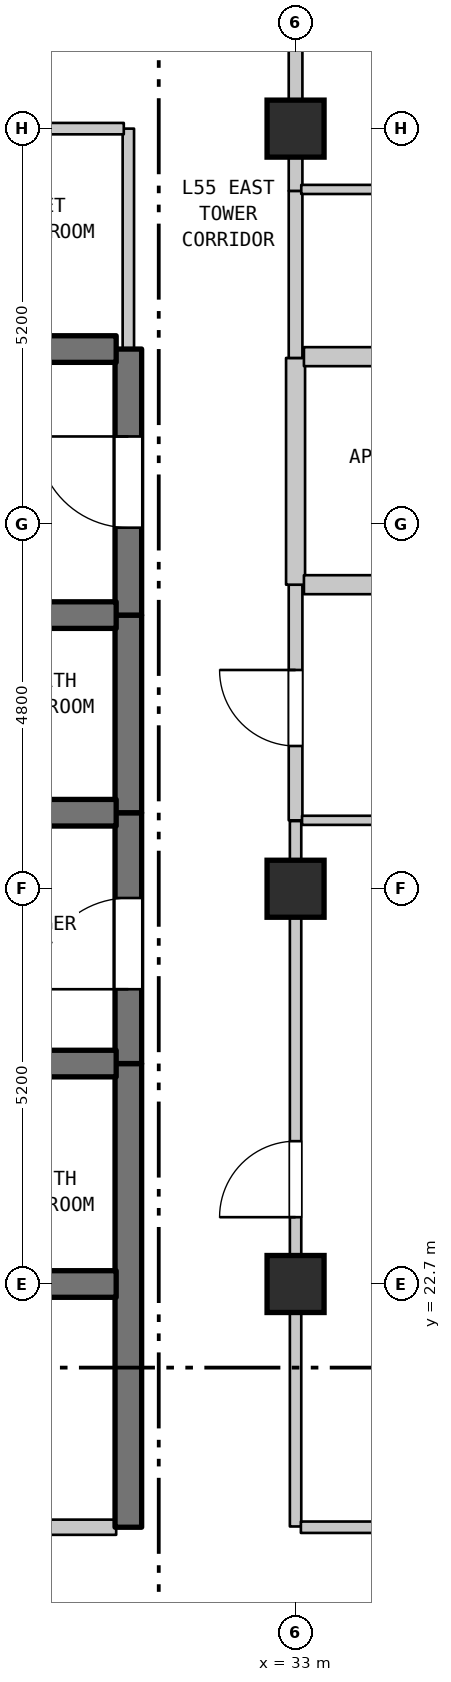
"""IFC4 building model, lengths in metres.
Left out: names, types, materials, properties, quantities, classifications, styles, units other than length and angle.
Written with IfcOpenShell. Run it as: python <this file> out.ifc"""

import sys

from ifc_helpers import new_model, si_unit, direction, frame, frame_2d, origin, origin_2d, place, context, subcontext, project, spatial, rectangle, extrude, element, fill, save


model = new_model("IFC4")
c1 = context("Model", 3, precision=1e-05, world=origin(), true_north=direction((0.0, 1.0)))
c2 = subcontext(c1, "Body", "Model", "MODEL_VIEW")
j1 = project(units=[si_unit("LENGTHUNIT", "METRE"), si_unit("PLANEANGLEUNIT", "RADIAN")], contexts=[c1])
p1 = place(None, origin())
s1 = spatial("IfcSite", under=j1, at=p1, CompositionType="ELEMENT")
p2 = place(p1, origin())
s2 = spatial("IfcBuilding", under=s1, at=p2, CompositionType="ELEMENT")
p3 = place(p2, frame((0.0, 0.0, 222.8)))
s3 = spatial("IfcBuildingStorey", under=s2, at=p3, CompositionType="ELEMENT", Elevation=222.8)
for number, where, z_axis, x_axis in (
    (1, (33.0, 22.7, 0.0), (0.0, 0.0, 1.0), (1.0, 0.0, 0.0)),
    (2, (33.0, 27.9, 0.0), (0.0, 0.0, 1.0), (1.0, 0.0, 0.0)),
    (3, (33.0, 37.9, 0.0), (0.0, 0.0, 1.0), (1.0, 0.0, 0.0)),
):
    element("IfcColumn", number, at=place(p3, frame(where, z_axis=z_axis, x_axis=x_axis)), inside=s3, PredefinedType="COLUMN", context=c2, shape_type="SweptSolid", body=[
        extrude(rectangle(XDim=0.75, YDim=0.75, at=origin_2d()), origin(), (0.0, 0.0, 1.0), 3.7),
    ])
p4 = place(p3, frame((30.8, 19.5, 0.0), z_axis=(0.0, 0.0, 1.0), x_axis=(0.0, 1.0, 0.0)))
e4 = element("IfcWall", 4, at=p4, inside=s3, PredefinedType="SHEAR", context=c2, shape_type="SweptSolid", body=[
    extrude(rectangle(XDim=6.1, YDim=0.35, at=frame_2d((3.05, 0.0))), origin(), (0.0, 0.0, 1.0), 3.39),
])
p5 = place(p3, frame((30.8, 25.6, 0.0), z_axis=(0.0, 0.0, 1.0), x_axis=(0.0, 1.0, 0.0)))
e5 = element("IfcWall", 5, at=p5, inside=s3, PredefinedType="SHEAR", context=c2, shape_type="SweptSolid", body=[
    extrude(rectangle(XDim=3.3, YDim=0.35, at=frame_2d((1.65, 0.0))), origin(), (0.0, 0.0, 1.0), 3.39),
])
p6 = place(p5, frame((0.978, 0.0, 0.0)))
e6 = element("IfcOpeningElement", 6, at=p6, cuts=e5, PredefinedType="OPENING", context=c2, shape_type="SweptSolid", body=[
    extrude(rectangle(XDim=1.2, YDim=2.2, at=frame_2d((0.6, 1.1))), frame((0.0, 0.185, 0.0), z_axis=(0.0, -1.0, 0.0), x_axis=(1.0, 0.0, 0.0)), (0.0, 0.0, 1.0), 0.37),
])
p7 = place(p3, frame((30.8, 28.9, 0.0), z_axis=(0.0, 0.0, 1.0), x_axis=(0.0, 1.0, 0.0)))
e7 = element("IfcWall", 7, at=p7, inside=s3, PredefinedType="SHEAR", context=c2, shape_type="SweptSolid", body=[
    extrude(rectangle(XDim=2.6, YDim=0.35, at=frame_2d((1.3, 0.0))), origin(), (0.0, 0.0, 1.0), 3.39),
])
p8 = place(p3, frame((30.8, 31.5, 0.0), z_axis=(0.0, 0.0, 1.0), x_axis=(0.0, 1.0, 0.0)))
e8 = element("IfcWall", 8, at=p8, inside=s3, PredefinedType="SHEAR", context=c2, shape_type="SweptSolid", body=[
    extrude(rectangle(XDim=3.5, YDim=0.35, at=frame_2d((1.75, 0.0))), origin(), (0.0, 0.0, 1.0), 3.39),
])
p9 = place(p8, frame((1.15, 0.0, 0.0)))
e9 = element("IfcOpeningElement", 9, at=p9, cuts=e8, PredefinedType="OPENING", context=c2, shape_type="SweptSolid", body=[
    extrude(rectangle(XDim=1.2, YDim=2.2, at=frame_2d((0.6, 1.1))), frame((0.0, 0.185, 0.0), z_axis=(0.0, -1.0, 0.0), x_axis=(1.0, 0.0, 0.0)), (0.0, 0.0, 1.0), 0.37),
])
p10 = place(p3, frame((30.8, 35.0, 0.0), z_axis=(0.0, 0.0, 1.0), x_axis=(0.0, 1.0, 0.0)))
e10 = element("IfcWall", 10, at=p10, inside=s3, PredefinedType="STANDARD", context=c2, shape_type="SweptSolid", body=[
    extrude(rectangle(XDim=2.9, YDim=0.15, at=frame_2d((1.45, 0.0))), origin(), (0.0, 0.0, 1.0), 3.39),
])
p11 = place(p3, frame((33.0, 19.51, 0.0), z_axis=(0.0, 0.0, 1.0), x_axis=(0.0, 1.0, 0.0)))
e11 = element("IfcWall", 11, at=p11, inside=s3, PredefinedType="STANDARD", context=c2, shape_type="SweptSolid", body=[
    extrude(rectangle(XDim=8.39, YDim=0.15, at=frame_2d((4.195, 0.0))), origin(), (0.0, 0.0, 1.0), 2.99),
])
p12 = place(p11, frame((4.069, 0.0, 0.0)))
e12 = element("IfcOpeningElement", 12, at=p12, cuts=e11, PredefinedType="OPENING", context=c2, shape_type="SweptSolid", body=[
    extrude(rectangle(XDim=1.0, YDim=2.15, at=frame_2d((0.5, 1.075))), frame((0.0, 0.085, 0.0), z_axis=(0.0, -1.0, 0.0), x_axis=(1.0, 0.0, 0.0)), (0.0, 0.0, 1.0), 0.17),
])
p13 = place(p3, frame((33.0, 28.8, 0.0), z_axis=(0.0, 0.0, 1.0), x_axis=(0.0, 1.0, 0.0)))
e13 = element("IfcWall", 13, at=p13, inside=s3, PredefinedType="STANDARD", context=c2, shape_type="SweptSolid", body=[
    extrude(rectangle(XDim=3.1, YDim=0.18, at=frame_2d((1.55, 0.0))), origin(), (0.0, 0.0, 1.0), 2.89),
])
p14 = place(p13, frame((0.978, 0.0, 0.0)))
e14 = element("IfcOpeningElement", 14, at=p14, cuts=e13, PredefinedType="OPENING", context=c2, shape_type="SweptSolid", body=[
    extrude(rectangle(XDim=1.0, YDim=2.15, at=frame_2d((0.5, 1.075))), frame((0.0, 0.1, 0.0), z_axis=(0.0, -1.0, 0.0), x_axis=(1.0, 0.0, 0.0)), (0.0, 0.0, 1.0), 0.2),
])
p15 = place(p3, frame((33.0, 31.9, 0.0), z_axis=(0.0, 0.0, 1.0), x_axis=(0.0, 1.0, 0.0)))
e15 = element("IfcWall", 15, at=p15, inside=s3, PredefinedType="STANDARD", context=c2, shape_type="SweptSolid", body=[
    extrude(rectangle(XDim=2.983, YDim=0.25, at=frame_2d((1.492, 0.0))), origin(), (0.0, 0.0, 1.0), 2.89),
])
p16 = place(p3, frame((33.0, 34.883, 0.0), z_axis=(0.0, 0.0, 1.0), x_axis=(0.0, 1.0, 0.0)))
e16 = element("IfcWall", 16, at=p16, inside=s3, PredefinedType="STANDARD", context=c2, shape_type="SweptSolid", body=[
    extrude(rectangle(XDim=2.198, YDim=0.18, at=frame_2d((1.099, 0.0))), origin(), (0.0, 0.0, 1.0), 2.89),
])
p17 = place(p3, frame((33.0, 37.081, 0.0), z_axis=(0.0, 0.0, 1.0), x_axis=(0.0, 1.0, 0.0)))
e17 = element("IfcWall", 17, at=p17, inside=s3, PredefinedType="STANDARD", context=c2, shape_type="SweptSolid", body=[
    extrude(rectangle(XDim=0.819, YDim=0.18, at=frame_2d((0.409, 0.0))), origin(), (0.0, 0.0, 1.0), 2.89),
])
p18 = place(p3, frame((25.985, 19.5, 0.0), z_axis=(0.0, 0.0, 1.0), x_axis=(1.0, 0.0, 0.0)))
e18 = element("IfcWall", 18, at=p18, inside=s3, PredefinedType="STANDARD", context=c2, shape_type="SweptSolid", body=[
    extrude(rectangle(XDim=4.655, YDim=0.2, at=frame_2d((2.327, 0.0))), origin(), (0.0, 0.0, 1.0), 3.39),
])
p19 = place(p18, frame((1.845, 0.0, 0.0)))
e19 = element("IfcOpeningElement", 19, at=p19, cuts=e18, PredefinedType="OPENING", context=c2, shape_type="SweptSolid", body=[
    extrude(rectangle(XDim=0.9, YDim=2.15, at=frame_2d((0.45, 1.075))), frame((0.0, 0.11, 0.0), z_axis=(0.0, -1.0, 0.0), x_axis=(1.0, 0.0, 0.0)), (0.0, 0.0, 1.0), 0.22),
])
p20 = place(p3, frame((33.07, 19.5, 0.0), z_axis=(0.0, 0.0, 1.0), x_axis=(1.0, 0.0, 0.0)))
e20 = element("IfcWall", 20, at=p20, inside=s3, PredefinedType="STANDARD", context=c2, shape_type="SweptSolid", body=[
    extrude(rectangle(XDim=18.87, YDim=0.15, at=frame_2d((9.435, 0.0))), origin(), (0.0, 0.0, 1.0), 3.39),
])
p21 = place(p20, frame((8.935, 0.0, 0.0)))
e21 = element("IfcOpeningElement", 21, at=p21, cuts=e20, PredefinedType="OPENING", context=c2, shape_type="SweptSolid", body=[
    extrude(rectangle(XDim=1.0, YDim=2.15, at=frame_2d((0.5, 1.075))), frame((0.0, 0.085, 0.0), z_axis=(0.0, -1.0, 0.0), x_axis=(1.0, 0.0, 0.0)), (0.0, 0.0, 1.0), 0.17),
])
p22 = place(p3, frame((27.46, 22.7, 0.0), z_axis=(0.0, 0.0, 1.0), x_axis=(1.0, 0.0, 0.0)))
e22 = element("IfcWall", 22, at=p22, inside=s3, PredefinedType="SHEAR", context=c2, shape_type="SweptSolid", body=[
    extrude(rectangle(XDim=3.18, YDim=0.35, at=frame_2d((1.59, 0.0))), origin(), (0.0, 0.0, 1.0), 3.39),
])
p23 = place(p3, frame((27.46, 25.6, 0.0), z_axis=(0.0, 0.0, 1.0), x_axis=(1.0, 0.0, 0.0)))
e23 = element("IfcWall", 23, at=p23, inside=s3, PredefinedType="SHEAR", context=c2, shape_type="SweptSolid", body=[
    extrude(rectangle(XDim=3.18, YDim=0.35, at=frame_2d((1.59, 0.0))), origin(), (0.0, 0.0, 1.0), 3.39),
])
p24 = place(p23, frame((1.14, 0.0, 0.0)))
e24 = element("IfcOpeningElement", 24, at=p24, cuts=e23, PredefinedType="OPENING", context=c2, shape_type="SweptSolid", body=[
    extrude(rectangle(XDim=0.9, YDim=2.15, at=frame_2d((0.45, 1.075))), frame((0.0, 0.185, 0.0), z_axis=(0.0, -1.0, 0.0), x_axis=(1.0, 0.0, 0.0)), (0.0, 0.0, 1.0), 0.37),
])
p25 = place(p3, frame((33.085, 28.8, 0.0), z_axis=(0.0, 0.0, 1.0), x_axis=(1.0, 0.0, 0.0)))
e25 = element("IfcWall", 25, at=p25, inside=s3, PredefinedType="PARTITIONING", context=c2, shape_type="SweptSolid", body=[
    extrude(rectangle(XDim=11.697, YDim=0.12, at=frame_2d((5.849, 0.0))), origin(), (0.0, 0.0, 1.0), 3.39),
])
p26 = place(p3, frame((27.46, 28.9, 0.0), z_axis=(0.0, 0.0, 1.0), x_axis=(1.0, 0.0, 0.0)))
e26 = element("IfcWall", 26, at=p26, inside=s3, PredefinedType="SHEAR", context=c2, shape_type="SweptSolid", body=[
    extrude(rectangle(XDim=3.18, YDim=0.35, at=frame_2d((1.59, 0.0))), origin(), (0.0, 0.0, 1.0), 3.39),
])
p27 = place(p26, frame((1.14, 0.0, 0.0)))
e27 = element("IfcOpeningElement", 27, at=p27, cuts=e26, PredefinedType="OPENING", context=c2, shape_type="SweptSolid", body=[
    extrude(rectangle(XDim=0.9, YDim=2.15, at=frame_2d((0.45, 1.075))), frame((0.0, 0.185, 0.0), z_axis=(0.0, -1.0, 0.0), x_axis=(1.0, 0.0, 0.0)), (0.0, 0.0, 1.0), 0.37),
])
p28 = place(p3, frame((23.96, 31.5, 0.0), z_axis=(0.0, 0.0, 1.0), x_axis=(1.0, 0.0, 0.0)))
e28 = element("IfcWall", 28, at=p28, inside=s3, PredefinedType="SHEAR", context=c2, shape_type="SweptSolid", body=[
    extrude(rectangle(XDim=6.68, YDim=0.35, at=frame_2d((3.34, 0.0))), origin(), (0.0, 0.0, 1.0), 3.39),
])
p29 = place(p28, frame((1.24, 0.0, 0.0)))
e29 = element("IfcOpeningElement", 29, at=p29, cuts=e28, PredefinedType="OPENING", context=c2, shape_type="SweptSolid", body=[
    extrude(rectangle(XDim=0.85, YDim=2.1, at=frame_2d((0.425, 1.05))), frame((0.0, 0.185, 0.0), z_axis=(0.0, -1.0, 0.0), x_axis=(1.0, 0.0, 0.0)), (0.0, 0.0, 1.0), 0.37),
])
for number, where, z_axis, x_axis in (
    (30, (33.11, 31.9, 0.0), (0.0, 0.0, 1.0), (1.0, 0.0, 0.0)),
    (31, (33.11, 34.9, 0.0), (0.0, 0.0, 1.0), (1.0, 0.0, 0.0)),
):
    element("IfcWall", number, at=place(p3, frame(where, z_axis=z_axis, x_axis=x_axis)), inside=s3, PredefinedType="STANDARD", context=c2, shape_type="SweptSolid", body=[
        extrude(rectangle(XDim=4.36, YDim=0.25, at=frame_2d((2.18, 0.0))), origin(), (0.0, 0.0, 1.0), 3.39),
    ])
p30 = place(p3, frame((26.645, 35.0, 0.0), z_axis=(0.0, 0.0, 1.0), x_axis=(1.0, 0.0, 0.0)))
e32 = element("IfcWall", 32, at=p30, inside=s3, PredefinedType="SHEAR", context=c2, shape_type="SweptSolid", body=[
    extrude(rectangle(XDim=3.995, YDim=0.35, at=frame_2d((1.998, 0.0))), origin(), (0.0, 0.0, 1.0), 3.39),
])
p31 = place(p30, frame((1.508, 0.0, 0.0)))
e33 = element("IfcOpeningElement", 33, at=p31, cuts=e32, PredefinedType="OPENING", context=c2, shape_type="SweptSolid", body=[
    extrude(rectangle(XDim=0.95, YDim=2.15, at=frame_2d((0.475, 1.075))), frame((0.0, 0.185, 0.0), z_axis=(0.0, -1.0, 0.0), x_axis=(1.0, 0.0, 0.0)), (0.0, 0.0, 1.0), 0.37),
])
p32 = place(p3, frame((33.075, 37.1, 0.0), z_axis=(0.0, 0.0, 1.0), x_axis=(1.0, 0.0, 0.0)))
e34 = element("IfcWall", 34, at=p32, inside=s3, PredefinedType="PARTITIONING", context=c2, shape_type="SweptSolid", body=[
    extrude(rectangle(XDim=4.46, YDim=0.12, at=frame_2d((2.23, 0.0))), origin(), (0.0, 0.0, 1.0), 3.39),
])
p33 = place(p3, frame((26.645, 37.9, 0.0), z_axis=(0.0, 0.0, 1.0), x_axis=(1.0, 0.0, 0.0)))
e35 = element("IfcWall", 35, at=p33, inside=s3, PredefinedType="STANDARD", context=c2, shape_type="SweptSolid", body=[
    extrude(rectangle(XDim=4.095, YDim=0.15, at=frame_2d((2.047, 0.0))), origin(), (0.0, 0.0, 1.0), 2.89),
])
p34 = place(p3, frame((33.0, 27.9, 0.0), z_axis=(0.0, 0.0, 1.0), x_axis=(0.0, 1.0, 0.0)))
e36 = element("IfcWall", 36, at=p34, inside=s3, PredefinedType="STANDARD", context=c2, shape_type="SweptSolid", body=[
    extrude(rectangle(XDim=0.89, YDim=0.15, at=frame_2d((0.445, 0.0))), origin(), (0.0, 0.0, 1.0), 2.89),
])
p35 = place(p3, frame((33.0, 37.9, 0.0), z_axis=(0.0, 0.0, 1.0), x_axis=(0.0, 1.0, 0.0)))
e37 = element("IfcWall", 37, at=p35, inside=s3, PredefinedType="STANDARD", context=c2, shape_type="SweptSolid", body=[
    extrude(rectangle(XDim=1.85, YDim=0.18, at=frame_2d((0.925, 0.0))), origin(), (0.0, 0.0, 1.0), 2.79),
])
p36 = place(p6, origin())
e38 = element("IfcDoor", 38, at=p36, inside=s3, OperationType="SINGLE_SWING_LEFT", PredefinedType="DOOR", context=c2, shape_type="SweptSolid", body=[
    extrude(rectangle(XDim=1.2, YDim=2.2, at=frame_2d((0.6, 1.1))), frame((0.0, 0.025, 0.0), z_axis=(0.0, -1.0, 0.0), x_axis=(1.0, 0.0, 0.0)), (0.0, 0.0, 1.0), 0.05),
])
fill(e6, e38)
p37 = place(p9, origin())
e39 = element("IfcDoor", 39, at=p37, inside=s3, OperationType="SINGLE_SWING_RIGHT", PredefinedType="DOOR", context=c2, shape_type="SweptSolid", body=[
    extrude(rectangle(XDim=1.2, YDim=2.2, at=frame_2d((0.6, 1.1))), frame((0.0, 0.025, 0.0), z_axis=(0.0, -1.0, 0.0), x_axis=(1.0, 0.0, 0.0)), (0.0, 0.0, 1.0), 0.05),
])
fill(e9, e39)
p38 = place(p12, origin())
e40 = element("IfcDoor", 40, at=p38, inside=s3, OperationType="SINGLE_SWING_LEFT", PredefinedType="DOOR", context=c2, shape_type="SweptSolid", body=[
    extrude(rectangle(XDim=1.0, YDim=2.15, at=frame_2d((0.5, 1.075))), frame((0.0, 0.025, 0.0), z_axis=(0.0, -1.0, 0.0), x_axis=(1.0, 0.0, 0.0)), (0.0, 0.0, 1.0), 0.05),
])
fill(e12, e40)
p39 = place(p14, origin())
e41 = element("IfcDoor", 41, at=p39, inside=s3, OperationType="SINGLE_SWING_RIGHT", PredefinedType="DOOR", context=c2, shape_type="SweptSolid", body=[
    extrude(rectangle(XDim=1.0, YDim=2.15, at=frame_2d((0.5, 1.075))), frame((0.0, 0.025, 0.0), z_axis=(0.0, -1.0, 0.0), x_axis=(1.0, 0.0, 0.0)), (0.0, 0.0, 1.0), 0.05),
])
fill(e14, e41)
save(model, sys.argv[1])
